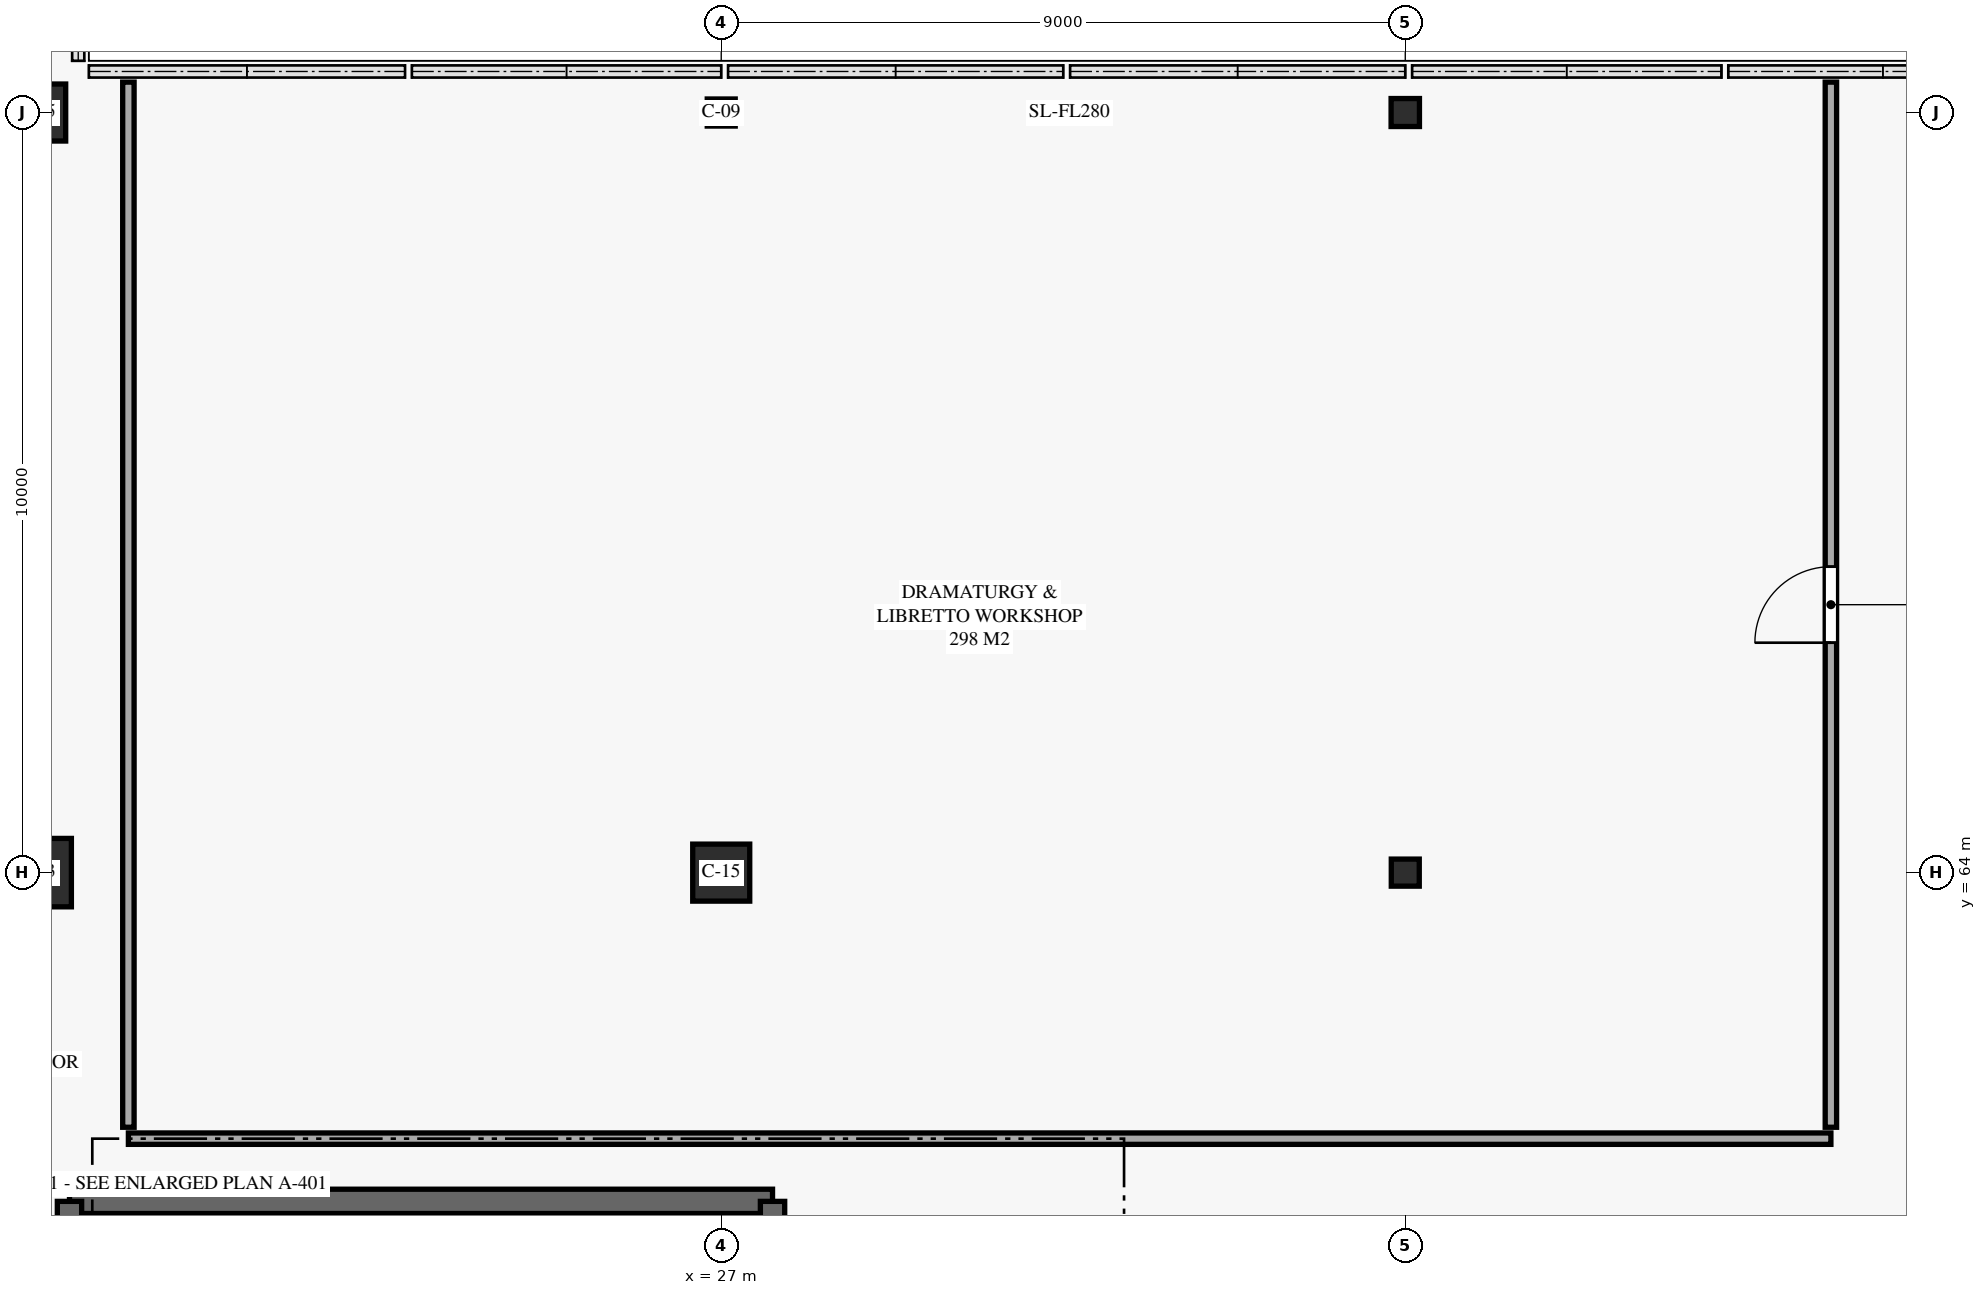
"""IFC4 building model, lengths in metres.
Left out: names, types, materials, properties, quantities, classifications, styles, units other than length and angle.
Written with IfcOpenShell. Run it as: python <this file> out.ifc"""

import sys

from ifc_helpers import new_model, si_unit, direction, frame, frame_2d, origin, origin_2d, place, context, subcontext, project, spatial, rectangle, i_section, extrude, element, fill, save


model = new_model("IFC4")
c1 = context("Model", 3, precision=1e-05, world=origin(), true_north=direction((0.0, 1.0)))
c2 = subcontext(c1, "Body", "Model", "MODEL_VIEW")
j1 = project(units=[si_unit("LENGTHUNIT", "METRE"), si_unit("PLANEANGLEUNIT", "RADIAN")], contexts=[c1])
p1 = place(None, origin())
s1 = spatial("IfcSite", under=j1, at=p1, CompositionType="ELEMENT")
p2 = place(p1, origin())
s2 = spatial("IfcBuilding", under=s1, at=p2, CompositionType="ELEMENT")
p3 = place(p2, frame((0.0, 0.0, 15.0)))
s3 = spatial("IfcBuildingStorey", under=s2, at=p3, CompositionType="ELEMENT", Elevation=15.0)
p4 = place(p3, frame((18.0, 64.0, 0.0), z_axis=(0.0, 0.0, 1.0), x_axis=(1.0, 0.0, 0.0)))
e1 = element("IfcColumn", 1, at=p4, inside=s3, PredefinedType="COLUMN", context=c2, shape_type="SweptSolid", body=[
    extrude(rectangle(XDim=0.9, YDim=0.9, at=origin_2d()), origin(), (0.0, 0.0, 1.0), 5.0),
])
for number, where, z_axis, x_axis in (
    (2, (18.0, 74.0, 0.0), (0.0, 0.0, 1.0), (1.0, 0.0, 0.0)),
    (3, (27.0, 64.0, 0.0), (0.0, 0.0, 1.0), (1.0, 0.0, 0.0)),
):
    element("IfcColumn", number, at=place(p3, frame(where, z_axis=z_axis, x_axis=x_axis)), inside=s3, PredefinedType="COLUMN", context=c2, shape_type="SweptSolid", body=[
        extrude(rectangle(XDim=0.75, YDim=0.75, at=origin_2d()), origin(), (0.0, 0.0, 1.0), 5.0),
    ])
for number, where, z_axis, x_axis in (
    (4, (27.0, 74.0, 0.0), (0.0, 0.0, 1.0), (1.0, 0.0, 0.0)),
    (5, (36.0, 64.0, 0.0), (0.0, 0.0, 1.0), (1.0, 0.0, 0.0)),
):
    element("IfcColumn", number, at=place(p3, frame(where, z_axis=z_axis, x_axis=x_axis)), inside=s3, PredefinedType="COLUMN", context=c2, shape_type="SweptSolid", body=[
        extrude(i_section(OverallWidth=0.368, OverallDepth=0.356, WebThickness=0.011, FlangeThickness=0.018, FilletRadius=0.015, at=origin_2d()), origin(), (0.0, 0.0, 1.0), 5.0),
    ])
p5 = place(p3, frame((36.0, 74.0, 0.0), z_axis=(0.0, 0.0, 1.0), x_axis=(1.0, 0.0, 0.0)))
e6 = element("IfcColumn", 6, at=p5, inside=s3, PredefinedType="COLUMN", context=c2, shape_type="SweptSolid", body=[
    extrude(i_section(OverallWidth=0.373, OverallDepth=0.368, WebThickness=0.015, FlangeThickness=0.024, FilletRadius=0.015, at=origin_2d()), origin(), (0.0, 0.0, 1.0), 5.0),
])
p6 = place(p3, frame((27.675, 59.675, 0.0), z_axis=(0.0, 0.0, 1.0), x_axis=(-1.0, 0.0, 0.0)))
e7 = element("IfcWall", 7, at=p6, inside=s3, PredefinedType="SHEAR", context=c2, shape_type="SweptSolid", body=[
    extrude(rectangle(XDim=9.25, YDim=0.32, at=frame_2d((4.625, 0.0))), origin(), (0.0, 0.0, 1.0), 4.72),
])
p7 = place(p3, frame((18.425, 59.675, 0.0), z_axis=(0.0, 0.0, 1.0), x_axis=(0.0, -1.0, 0.0)))
e8 = element("IfcWall", 8, at=p7, inside=s3, PredefinedType="SHEAR", context=c2, shape_type="SweptSolid", body=[
    extrude(rectangle(XDim=5.05, YDim=0.32, at=frame_2d((2.525, 0.0))), origin(), (0.0, 0.0, 1.0), 4.72),
])
p8 = place(p7, frame((1.85, 0.0, 0.0)))
e9 = element("IfcOpeningElement", 9, at=p8, cuts=e8, PredefinedType="OPENING", context=c2, shape_type="SweptSolid", body=[
    extrude(rectangle(XDim=1.15, YDim=2.2, at=frame_2d((0.575, 1.1))), frame((0.0, 0.17, 0.0), z_axis=(0.0, -1.0, 0.0), x_axis=(1.0, 0.0, 0.0)), (0.0, 0.0, 1.0), 0.34),
])
p9 = place(p3, frame((27.675, 54.625, 0.0), z_axis=(0.0, 0.0, 1.0), x_axis=(0.0, 1.0, 0.0)))
e10 = element("IfcWall", 10, at=p9, inside=s3, PredefinedType="SHEAR", context=c2, shape_type="SweptSolid", body=[
    extrude(rectangle(XDim=5.05, YDim=0.32, at=frame_2d((2.525, 0.0))), origin(), (0.0, 0.0, 1.0), 4.72),
])
p10 = place(p3, frame((19.2, 60.5, 0.0), z_axis=(0.0, 0.0, 1.0), x_axis=(1.0, 0.0, 0.0)))
e11 = element("IfcWall", 11, at=p10, inside=s3, PredefinedType="PARTITIONING", context=c2, shape_type="SweptSolid", body=[
    extrude(rectangle(XDim=22.4, YDim=0.15, at=frame_2d((11.2, 0.0))), origin(), (0.0, 0.0, 1.0), 4.72),
])
p11 = place(p3, frame((19.2, 74.4, 0.0), z_axis=(0.0, 0.0, 1.0), x_axis=(0.0, -1.0, 0.0)))
e12 = element("IfcWall", 12, at=p11, inside=s3, PredefinedType="PARTITIONING", context=c2, shape_type="SweptSolid", body=[
    extrude(rectangle(XDim=13.75, YDim=0.15, at=frame_2d((6.875, 0.0))), origin(), (0.0, 0.0, 1.0), 4.72),
])
p12 = place(p3, frame((41.6, 60.65, 0.0), z_axis=(0.0, 0.0, 1.0), x_axis=(0.0, 1.0, 0.0)))
e13 = element("IfcWall", 13, at=p12, inside=s3, PredefinedType="PARTITIONING", context=c2, shape_type="SweptSolid", body=[
    extrude(rectangle(XDim=13.75, YDim=0.15, at=frame_2d((6.875, 0.0))), origin(), (0.0, 0.0, 1.0), 4.72),
])
p13 = place(p12, frame((6.375, 0.0, 0.0)))
e14 = element("IfcOpeningElement", 14, at=p13, cuts=e13, PredefinedType="OPENING", context=c2, shape_type="SweptSolid", body=[
    extrude(rectangle(XDim=1.0, YDim=2.15, at=frame_2d((0.5, 1.075))), frame((0.0, 0.085, 0.0), z_axis=(0.0, -1.0, 0.0), x_axis=(1.0, 0.0, 0.0)), (0.0, 0.0, 1.0), 0.17),
])
p14 = place(p13, origin())
e15 = element("IfcDoor", 15, at=p14, inside=s3, OperationType="SINGLE_SWING_LEFT", PredefinedType="DOOR", context=c2, shape_type="SweptSolid", body=[
    extrude(rectangle(XDim=1.0, YDim=2.15, at=frame_2d((0.5, 1.075))), frame((0.0, 0.025, 0.0), z_axis=(0.0, -1.0, 0.0), x_axis=(1.0, 0.0, 0.0)), (0.0, 0.0, 1.0), 0.05),
])
fill(e14, e15)
save(model, sys.argv[1])
